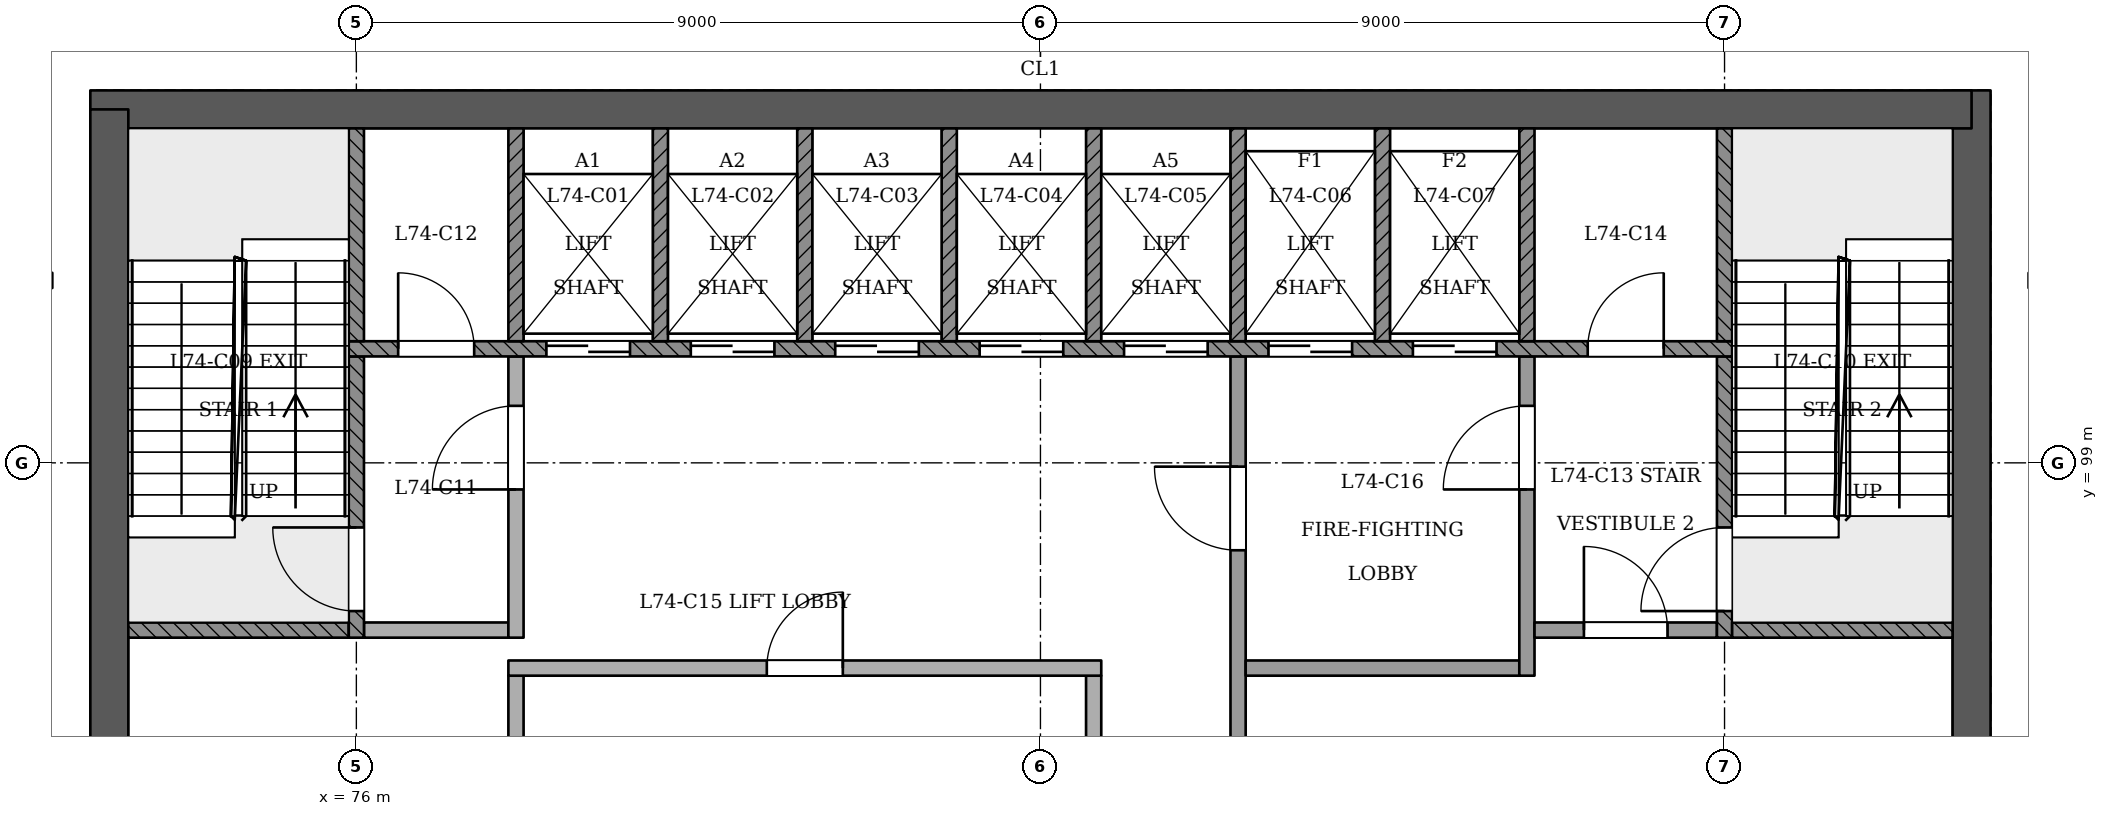
"""IFC4 building model, lengths in metres.
Left out: names, types, materials, properties, quantities, classifications, styles, units other than length and angle.
Written with IfcOpenShell. Run it as: python <this file> out.ifc"""

import sys

from ifc_helpers import new_model, si_unit, direction, frame, frame_2d, origin, place, context, subcontext, project, spatial, rectangle, extrude, element, fill, save


model = new_model("IFC4")
c1 = context("Model", 3, precision=1e-05, world=origin(), true_north=direction((0.0, 1.0)))
c2 = subcontext(c1, "Body", "Model", "MODEL_VIEW")
j1 = project(units=[si_unit("LENGTHUNIT", "METRE"), si_unit("PLANEANGLEUNIT", "RADIAN")], contexts=[c1])
p1 = place(None, origin())
s1 = spatial("IfcSite", under=j1, at=p1, CompositionType="ELEMENT")
p2 = place(p1, origin())
s2 = spatial("IfcBuilding", under=s1, at=p2, CompositionType="ELEMENT")
p3 = place(p2, frame((0.0, 0.0, 286.0)))
s3 = spatial("IfcBuildingStorey", under=s2, at=p3, CompositionType="ELEMENT", Elevation=286.0)
p4 = place(p3, frame((97.25, 93.15, 0.0), z_axis=(0.0, 0.0, 1.0), x_axis=(0.0, 1.0, 0.0)))
e1 = element("IfcWall", 1, at=p4, inside=s3, PredefinedType="SHEAR", context=c2, shape_type="SweptSolid", body=[
    extrude(rectangle(XDim=10.75, YDim=0.5, at=frame_2d((5.375, 0.0))), origin(), (0.0, 0.0, 1.0), 5.4),
])
p5 = place(p3, frame((97.25, 103.65, 0.0), z_axis=(0.0, 0.0, 1.0), x_axis=(-1.0, 0.0, 0.0)))
e2 = element("IfcWall", 2, at=p5, inside=s3, PredefinedType="SHEAR", context=c2, shape_type="SweptSolid", body=[
    extrude(rectangle(XDim=24.75, YDim=0.5, at=frame_2d((12.375, 0.0))), origin(), (0.0, 0.0, 1.0), 5.4),
])
p6 = place(p3, frame((72.75, 103.65, 0.0), z_axis=(0.0, 0.0, 1.0), x_axis=(0.0, -1.0, 0.0)))
e3 = element("IfcWall", 3, at=p6, inside=s3, PredefinedType="SHEAR", context=c2, shape_type="SweptSolid", body=[
    extrude(rectangle(XDim=10.75, YDim=0.5, at=frame_2d((5.375, 0.0))), origin(), (0.0, 0.0, 1.0), 5.4),
])
p7 = place(p3, frame((99.704, 101.4, 0.0), z_axis=(0.0, 0.0, 1.0), x_axis=(-1.0, 0.0, 0.0)))
e4 = element("IfcWall", 4, at=p7, inside=s3, PredefinedType="PARTITIONING", context=c2, shape_type="SweptSolid", body=[
    extrude(rectangle(XDim=1.704, YDim=0.2, at=frame_2d((0.852, 0.0))), origin(), (0.0, 0.0, 1.0), 5.0),
])
for number, where, z_axis, x_axis in (
    (5, (78.1, 93.4, 0.0), (0.0, 0.0, 1.0), (0.0, 1.0, 0.0)),
    (6, (85.7, 93.4, 0.0), (0.0, 0.0, 1.0), (0.0, 1.0, 0.0)),
):
    element("IfcWall", number, at=place(p3, frame(where, z_axis=z_axis, x_axis=x_axis)), inside=s3, PredefinedType="PARTITIONING", context=c2, shape_type="SweptSolid", body=[
        extrude(rectangle(XDim=2.8, YDim=0.2, at=frame_2d((1.4, 0.0))), origin(), (0.0, 0.0, 1.0), 5.0),
    ])
p8 = place(p3, frame((87.6, 93.4, 0.0), z_axis=(0.0, 0.0, 1.0), x_axis=(0.0, 1.0, 0.0)))
e7 = element("IfcWall", 7, at=p8, inside=s3, PredefinedType="PARTITIONING", context=c2, shape_type="SweptSolid", body=[
    extrude(rectangle(XDim=7.0, YDim=0.2, at=frame_2d((3.5, 0.0))), origin(), (0.0, 0.0, 1.0), 5.0),
])
p9 = place(p8, frame((4.45, 0.0, 0.0)))
e8 = element("IfcOpeningElement", 8, at=p9, cuts=e7, PredefinedType="OPENING", context=c2, shape_type="SweptSolid", body=[
    extrude(rectangle(XDim=1.1, YDim=2.1, at=frame_2d((0.55, 1.05))), frame((0.0, 0.11, 0.0), z_axis=(0.0, -1.0, 0.0), x_axis=(1.0, 0.0, 0.0)), (0.0, 0.0, 1.0), 0.221),
])
p10 = place(p3, frame((78.0, 96.3, 0.0), z_axis=(0.0, 0.0, 1.0), x_axis=(1.0, 0.0, 0.0)))
e9 = element("IfcWall", 9, at=p10, inside=s3, PredefinedType="PARTITIONING", context=c2, shape_type="SweptSolid", body=[
    extrude(rectangle(XDim=7.8, YDim=0.2, at=frame_2d((3.9, 0.0))), origin(), (0.0, 0.0, 1.0), 5.0),
])
p11 = place(p10, frame((3.4, 0.0, 0.0)))
e10 = element("IfcOpeningElement", 10, at=p11, cuts=e9, PredefinedType="OPENING", context=c2, shape_type="SweptSolid", body=[
    extrude(rectangle(XDim=1.0, YDim=2.1, at=frame_2d((0.5, 1.05))), frame((0.0, 0.11, 0.0), z_axis=(0.0, -1.0, 0.0), x_axis=(1.0, 0.0, 0.0)), (0.0, 0.0, 1.0), 0.221),
])
p12 = place(p3, frame((87.7, 96.3, 0.0), z_axis=(0.0, 0.0, 1.0), x_axis=(1.0, 0.0, 0.0)))
e11 = element("IfcWall", 11, at=p12, inside=s3, PredefinedType="PARTITIONING", context=c2, shape_type="SweptSolid", body=[
    extrude(rectangle(XDim=3.6, YDim=0.2, at=frame_2d((1.8, 0.0))), origin(), (0.0, 0.0, 1.0), 5.0),
])
p13 = place(p3, frame((91.4, 96.2, 0.0), z_axis=(0.0, 0.0, 1.0), x_axis=(0.0, 1.0, 0.0)))
e12 = element("IfcWall", 12, at=p13, inside=s3, PredefinedType="PARTITIONING", context=c2, shape_type="SweptSolid", body=[
    extrude(rectangle(XDim=4.2, YDim=0.2, at=frame_2d((2.1, 0.0))), origin(), (0.0, 0.0, 1.0), 5.0),
])
p14 = place(p13, frame((2.45, 0.0, 0.0)))
e13 = element("IfcOpeningElement", 13, at=p14, cuts=e12, PredefinedType="OPENING", context=c2, shape_type="SweptSolid", body=[
    extrude(rectangle(XDim=1.1, YDim=2.1, at=frame_2d((0.55, 1.05))), frame((0.0, 0.11, 0.0), z_axis=(0.0, -1.0, 0.0), x_axis=(1.0, 0.0, 0.0)), (0.0, 0.0, 1.0), 0.221),
])
p15 = place(p3, frame((73.0, 96.8, 0.0), z_axis=(0.0, 0.0, 1.0), x_axis=(1.0, 0.0, 0.0)))
e14 = element("IfcWall", 14, at=p15, inside=s3, PredefinedType="SOLIDWALL", context=c2, shape_type="SweptSolid", body=[
    extrude(rectangle(XDim=2.9, YDim=0.2, at=frame_2d((1.45, 0.0))), origin(), (0.0, 0.0, 1.0), 5.0),
])
p16 = place(p3, frame((76.0, 96.7, 0.0), z_axis=(0.0, 0.0, 1.0), x_axis=(0.0, 1.0, 0.0)))
e15 = element("IfcWall", 15, at=p16, inside=s3, PredefinedType="SOLIDWALL", context=c2, shape_type="SweptSolid", body=[
    extrude(rectangle(XDim=3.7, YDim=0.2, at=frame_2d((1.85, 0.0))), origin(), (0.0, 0.0, 1.0), 5.0),
])
p17 = place(p16, frame((0.35, 0.0, 0.0)))
e16 = element("IfcOpeningElement", 16, at=p17, cuts=e15, PredefinedType="OPENING", context=c2, shape_type="SweptSolid", body=[
    extrude(rectangle(XDim=1.1, YDim=2.1, at=frame_2d((0.55, 1.05))), frame((0.0, 0.11, 0.0), z_axis=(0.0, -1.0, 0.0), x_axis=(1.0, 0.0, 0.0)), (0.0, 0.0, 1.0), 0.221),
])
p18 = place(p3, frame((76.1, 96.8, 0.0), z_axis=(0.0, 0.0, 1.0), x_axis=(1.0, 0.0, 0.0)))
e17 = element("IfcWall", 17, at=p18, inside=s3, PredefinedType="PARTITIONING", context=c2, shape_type="SweptSolid", body=[
    extrude(rectangle(XDim=1.9, YDim=0.2, at=frame_2d((0.95, 0.0))), origin(), (0.0, 0.0, 1.0), 5.0),
])
p19 = place(p3, frame((78.1, 96.7, 0.0), z_axis=(0.0, 0.0, 1.0), x_axis=(0.0, 1.0, 0.0)))
e18 = element("IfcWall", 18, at=p19, inside=s3, PredefinedType="PARTITIONING", context=c2, shape_type="SweptSolid", body=[
    extrude(rectangle(XDim=3.7, YDim=0.2, at=frame_2d((1.85, 0.0))), origin(), (0.0, 0.0, 1.0), 5.0),
])
p20 = place(p19, frame((1.95, 0.0, 0.0)))
e19 = element("IfcOpeningElement", 19, at=p20, cuts=e18, PredefinedType="OPENING", context=c2, shape_type="SweptSolid", body=[
    extrude(rectangle(XDim=1.1, YDim=2.1, at=frame_2d((0.55, 1.05))), frame((0.0, 0.11, 0.0), z_axis=(0.0, -1.0, 0.0), x_axis=(1.0, 0.0, 0.0)), (0.0, 0.0, 1.0), 0.221),
])
p21 = place(p3, frame((91.5, 96.8, 0.0), z_axis=(0.0, 0.0, 1.0), x_axis=(1.0, 0.0, 0.0)))
e20 = element("IfcWall", 20, at=p21, inside=s3, PredefinedType="PARTITIONING", context=c2, shape_type="SweptSolid", body=[
    extrude(rectangle(XDim=2.4, YDim=0.2, at=frame_2d((1.2, 0.0))), origin(), (0.0, 0.0, 1.0), 5.0),
])
p22 = place(p21, frame((0.65, 0.0, 0.0)))
e21 = element("IfcOpeningElement", 21, at=p22, cuts=e20, PredefinedType="OPENING", context=c2, shape_type="SweptSolid", body=[
    extrude(rectangle(XDim=1.1, YDim=2.1, at=frame_2d((0.55, 1.05))), frame((0.0, 0.11, 0.0), z_axis=(0.0, -1.0, 0.0), x_axis=(1.0, 0.0, 0.0)), (0.0, 0.0, 1.0), 0.221),
])
p23 = place(p3, frame((94.0, 96.7, 0.0), z_axis=(0.0, 0.0, 1.0), x_axis=(0.0, 1.0, 0.0)))
e22 = element("IfcWall", 22, at=p23, inside=s3, PredefinedType="SOLIDWALL", context=c2, shape_type="SweptSolid", body=[
    extrude(rectangle(XDim=3.7, YDim=0.2, at=frame_2d((1.85, 0.0))), origin(), (0.0, 0.0, 1.0), 5.0),
])
p24 = place(p23, frame((0.35, 0.0, 0.0)))
e23 = element("IfcOpeningElement", 23, at=p24, cuts=e22, PredefinedType="OPENING", context=c2, shape_type="SweptSolid", body=[
    extrude(rectangle(XDim=1.1, YDim=2.1, at=frame_2d((0.55, 1.05))), frame((0.0, 0.11, 0.0), z_axis=(0.0, -1.0, 0.0), x_axis=(1.0, 0.0, 0.0)), (0.0, 0.0, 1.0), 0.221),
])
p25 = place(p3, frame((94.1, 96.8, 0.0), z_axis=(0.0, 0.0, 1.0), x_axis=(1.0, 0.0, 0.0)))
e24 = element("IfcWall", 24, at=p25, inside=s3, PredefinedType="SOLIDWALL", context=c2, shape_type="SweptSolid", body=[
    extrude(rectangle(XDim=2.9, YDim=0.2, at=frame_2d((1.45, 0.0))), origin(), (0.0, 0.0, 1.0), 5.0),
])
p26 = place(p3, frame((75.9, 100.5, 0.0), z_axis=(0.0, 0.0, 1.0), x_axis=(1.0, 0.0, 0.0)))
e25 = element("IfcWall", 25, at=p26, inside=s3, PredefinedType="SOLIDWALL", context=c2, shape_type="SweptSolid", body=[
    extrude(rectangle(XDim=18.2, YDim=0.2, at=frame_2d((9.1, 0.0))), origin(), (0.0, 0.0, 1.0), 5.0),
])
p27 = place(p26, frame((2.6, 0.0, 0.0)))
e26 = element("IfcOpeningElement", 26, at=p27, cuts=e25, PredefinedType="OPENING", context=c2, shape_type="SweptSolid", body=[
    extrude(rectangle(XDim=1.1, YDim=2.1, at=frame_2d((0.55, 1.05))), frame((0.0, 0.11, 0.0), z_axis=(0.0, -1.0, 0.0), x_axis=(1.0, 0.0, 0.0)), (0.0, 0.0, 1.0), 0.221),
])
p28 = place(p26, frame((4.5, 0.0, 0.0)))
e27 = element("IfcOpeningElement", 27, at=p28, cuts=e25, PredefinedType="OPENING", context=c2, shape_type="SweptSolid", body=[
    extrude(rectangle(XDim=1.1, YDim=2.1, at=frame_2d((0.55, 1.05))), frame((0.0, 0.11, 0.0), z_axis=(0.0, -1.0, 0.0), x_axis=(1.0, 0.0, 0.0)), (0.0, 0.0, 1.0), 0.221),
])
p29 = place(p26, frame((6.4, 0.0, 0.0)))
e28 = element("IfcOpeningElement", 28, at=p29, cuts=e25, PredefinedType="OPENING", context=c2, shape_type="SweptSolid", body=[
    extrude(rectangle(XDim=1.1, YDim=2.1, at=frame_2d((0.55, 1.05))), frame((0.0, 0.11, 0.0), z_axis=(0.0, -1.0, 0.0), x_axis=(1.0, 0.0, 0.0)), (0.0, 0.0, 1.0), 0.221),
])
p30 = place(p26, frame((8.3, 0.0, 0.0)))
e29 = element("IfcOpeningElement", 29, at=p30, cuts=e25, PredefinedType="OPENING", context=c2, shape_type="SweptSolid", body=[
    extrude(rectangle(XDim=1.1, YDim=2.1, at=frame_2d((0.55, 1.05))), frame((0.0, 0.11, 0.0), z_axis=(0.0, -1.0, 0.0), x_axis=(1.0, 0.0, 0.0)), (0.0, 0.0, 1.0), 0.221),
])
p31 = place(p26, frame((10.2, 0.0, 0.0)))
e30 = element("IfcOpeningElement", 30, at=p31, cuts=e25, PredefinedType="OPENING", context=c2, shape_type="SweptSolid", body=[
    extrude(rectangle(XDim=1.1, YDim=2.1, at=frame_2d((0.55, 1.05))), frame((0.0, 0.11, 0.0), z_axis=(0.0, -1.0, 0.0), x_axis=(1.0, 0.0, 0.0)), (0.0, 0.0, 1.0), 0.221),
])
p32 = place(p26, frame((12.1, 0.0, 0.0)))
e31 = element("IfcOpeningElement", 31, at=p32, cuts=e25, PredefinedType="OPENING", context=c2, shape_type="SweptSolid", body=[
    extrude(rectangle(XDim=1.1, YDim=2.1, at=frame_2d((0.55, 1.05))), frame((0.0, 0.11, 0.0), z_axis=(0.0, -1.0, 0.0), x_axis=(1.0, 0.0, 0.0)), (0.0, 0.0, 1.0), 0.221),
])
p33 = place(p26, frame((14.0, 0.0, 0.0)))
e32 = element("IfcOpeningElement", 32, at=p33, cuts=e25, PredefinedType="OPENING", context=c2, shape_type="SweptSolid", body=[
    extrude(rectangle(XDim=1.1, YDim=2.1, at=frame_2d((0.55, 1.05))), frame((0.0, 0.11, 0.0), z_axis=(0.0, -1.0, 0.0), x_axis=(1.0, 0.0, 0.0)), (0.0, 0.0, 1.0), 0.221),
])
p34 = place(p26, frame((0.65, 0.0, 0.0)))
e33 = element("IfcOpeningElement", 33, at=p34, cuts=e25, PredefinedType="OPENING", context=c2, shape_type="SweptSolid", body=[
    extrude(rectangle(XDim=1.0, YDim=2.1, at=frame_2d((0.5, 1.05))), frame((0.0, 0.11, 0.0), z_axis=(0.0, -1.0, 0.0), x_axis=(1.0, 0.0, 0.0)), (0.0, 0.0, 1.0), 0.221),
])
p35 = place(p26, frame((16.3, 0.0, 0.0)))
e34 = element("IfcOpeningElement", 34, at=p35, cuts=e25, PredefinedType="OPENING", context=c2, shape_type="SweptSolid", body=[
    extrude(rectangle(XDim=1.0, YDim=2.1, at=frame_2d((0.5, 1.05))), frame((0.0, 0.11, 0.0), z_axis=(0.0, -1.0, 0.0), x_axis=(1.0, 0.0, 0.0)), (0.0, 0.0, 1.0), 0.221),
])
for number, where, z_axis, x_axis in (
    (35, (76.0, 100.6, 0.0), (0.0, 0.0, 1.0), (0.0, 1.0, 0.0)),
    (36, (78.1, 100.6, 0.0), (0.0, 0.0, 1.0), (0.0, 1.0, 0.0)),
    (37, (80.0, 100.6, 0.0), (0.0, 0.0, 1.0), (0.0, 1.0, 0.0)),
    (38, (81.9, 100.6, 0.0), (0.0, 0.0, 1.0), (0.0, 1.0, 0.0)),
    (39, (83.8, 100.6, 0.0), (0.0, 0.0, 1.0), (0.0, 1.0, 0.0)),
    (40, (85.7, 100.6, 0.0), (0.0, 0.0, 1.0), (0.0, 1.0, 0.0)),
    (41, (87.6, 100.6, 0.0), (0.0, 0.0, 1.0), (0.0, 1.0, 0.0)),
    (42, (89.5, 100.6, 0.0), (0.0, 0.0, 1.0), (0.0, 1.0, 0.0)),
    (43, (91.4, 100.6, 0.0), (0.0, 0.0, 1.0), (0.0, 1.0, 0.0)),
    (44, (94.0, 100.6, 0.0), (0.0, 0.0, 1.0), (0.0, 1.0, 0.0)),
):
    element("IfcWall", number, at=place(p3, frame(where, z_axis=z_axis, x_axis=x_axis)), inside=s3, PredefinedType="SOLIDWALL", context=c2, shape_type="SweptSolid", body=[
        extrude(rectangle(XDim=2.8, YDim=0.2, at=frame_2d((1.4, 0.0))), origin(), (0.0, 0.0, 1.0), 5.0),
    ])
p36 = place(p27, origin())
e45 = element("IfcDoor", 45, at=p36, inside=s3, OperationType="SLIDING_TO_RIGHT", PredefinedType="NOTDEFINED", context=c2, shape_type="SweptSolid", body=[
    extrude(rectangle(XDim=1.1, YDim=2.1, at=frame_2d((0.55, 1.05))), frame((0.0, 0.025, 0.0), z_axis=(0.0, -1.0, 0.0), x_axis=(1.0, 0.0, 0.0)), (0.0, 0.0, 1.0), 0.05),
])
fill(e26, e45)
p37 = place(p28, origin())
e46 = element("IfcDoor", 46, at=p37, inside=s3, OperationType="SLIDING_TO_LEFT", PredefinedType="NOTDEFINED", context=c2, shape_type="SweptSolid", body=[
    extrude(rectangle(XDim=1.1, YDim=2.1, at=frame_2d((0.55, 1.05))), frame((0.0, 0.025, 0.0), z_axis=(0.0, -1.0, 0.0), x_axis=(1.0, 0.0, 0.0)), (0.0, 0.0, 1.0), 0.05),
])
fill(e27, e46)
p38 = place(p29, origin())
e47 = element("IfcDoor", 47, at=p38, inside=s3, OperationType="SLIDING_TO_RIGHT", PredefinedType="NOTDEFINED", context=c2, shape_type="SweptSolid", body=[
    extrude(rectangle(XDim=1.1, YDim=2.1, at=frame_2d((0.55, 1.05))), frame((0.0, 0.025, 0.0), z_axis=(0.0, -1.0, 0.0), x_axis=(1.0, 0.0, 0.0)), (0.0, 0.0, 1.0), 0.05),
])
fill(e28, e47)
p39 = place(p30, origin())
e48 = element("IfcDoor", 48, at=p39, inside=s3, OperationType="SLIDING_TO_LEFT", PredefinedType="NOTDEFINED", context=c2, shape_type="SweptSolid", body=[
    extrude(rectangle(XDim=1.1, YDim=2.1, at=frame_2d((0.55, 1.05))), frame((0.0, 0.025, 0.0), z_axis=(0.0, -1.0, 0.0), x_axis=(1.0, 0.0, 0.0)), (0.0, 0.0, 1.0), 0.05),
])
fill(e29, e48)
p40 = place(p31, origin())
e49 = element("IfcDoor", 49, at=p40, inside=s3, OperationType="SLIDING_TO_RIGHT", PredefinedType="NOTDEFINED", context=c2, shape_type="SweptSolid", body=[
    extrude(rectangle(XDim=1.1, YDim=2.1, at=frame_2d((0.55, 1.05))), frame((0.0, 0.025, 0.0), z_axis=(0.0, -1.0, 0.0), x_axis=(1.0, 0.0, 0.0)), (0.0, 0.0, 1.0), 0.05),
])
fill(e30, e49)
p41 = place(p32, origin())
e50 = element("IfcDoor", 50, at=p41, inside=s3, OperationType="SLIDING_TO_RIGHT", PredefinedType="NOTDEFINED", context=c2, shape_type="SweptSolid", body=[
    extrude(rectangle(XDim=1.1, YDim=2.1, at=frame_2d((0.55, 1.05))), frame((0.0, 0.025, 0.0), z_axis=(0.0, -1.0, 0.0), x_axis=(1.0, 0.0, 0.0)), (0.0, 0.0, 1.0), 0.05),
])
fill(e31, e50)
p42 = place(p33, origin())
e51 = element("IfcDoor", 51, at=p42, inside=s3, OperationType="SLIDING_TO_LEFT", PredefinedType="NOTDEFINED", context=c2, shape_type="SweptSolid", body=[
    extrude(rectangle(XDim=1.1, YDim=2.1, at=frame_2d((0.55, 1.05))), frame((0.0, 0.025, 0.0), z_axis=(0.0, -1.0, 0.0), x_axis=(1.0, 0.0, 0.0)), (0.0, 0.0, 1.0), 0.05),
])
fill(e32, e51)
p43 = place(p17, origin())
e52 = element("IfcDoor", 52, at=p43, inside=s3, OperationType="SINGLE_SWING_RIGHT", PredefinedType="NOTDEFINED", context=c2, shape_type="SweptSolid", body=[
    extrude(rectangle(XDim=1.1, YDim=2.1, at=frame_2d((0.55, 1.05))), frame((0.0, 0.025, 0.0), z_axis=(0.0, -1.0, 0.0), x_axis=(1.0, 0.0, 0.0)), (0.0, 0.0, 1.0), 0.05),
])
fill(e16, e52)
p44 = place(p24, origin())
e53 = element("IfcDoor", 53, at=p44, inside=s3, OperationType="SINGLE_SWING_LEFT", PredefinedType="NOTDEFINED", context=c2, shape_type="SweptSolid", body=[
    extrude(rectangle(XDim=1.1, YDim=2.1, at=frame_2d((0.55, 1.05))), frame((0.0, 0.025, 0.0), z_axis=(0.0, -1.0, 0.0), x_axis=(1.0, 0.0, 0.0)), (0.0, 0.0, 1.0), 0.05),
])
fill(e23, e53)
p45 = place(p20, origin())
e54 = element("IfcDoor", 54, at=p45, inside=s3, OperationType="SINGLE_SWING_LEFT", PredefinedType="NOTDEFINED", context=c2, shape_type="SweptSolid", body=[
    extrude(rectangle(XDim=1.1, YDim=2.1, at=frame_2d((0.55, 1.05))), frame((0.0, 0.025, 0.0), z_axis=(0.0, -1.0, 0.0), x_axis=(1.0, 0.0, 0.0)), (0.0, 0.0, 1.0), 0.05),
])
fill(e19, e54)
p46 = place(p9, origin())
e55 = element("IfcDoor", 55, at=p46, inside=s3, OperationType="SINGLE_SWING_RIGHT", PredefinedType="NOTDEFINED", context=c2, shape_type="SweptSolid", body=[
    extrude(rectangle(XDim=1.1, YDim=2.1, at=frame_2d((0.55, 1.05))), frame((0.0, 0.025, 0.0), z_axis=(0.0, -1.0, 0.0), x_axis=(1.0, 0.0, 0.0)), (0.0, 0.0, 1.0), 0.05),
])
fill(e8, e55)
p47 = place(p14, origin())
e56 = element("IfcDoor", 56, at=p47, inside=s3, OperationType="SINGLE_SWING_LEFT", PredefinedType="NOTDEFINED", context=c2, shape_type="SweptSolid", body=[
    extrude(rectangle(XDim=1.1, YDim=2.1, at=frame_2d((0.55, 1.05))), frame((0.0, 0.025, 0.0), z_axis=(0.0, -1.0, 0.0), x_axis=(1.0, 0.0, 0.0)), (0.0, 0.0, 1.0), 0.05),
])
fill(e13, e56)
p48 = place(p34, origin())
e57 = element("IfcDoor", 57, at=p48, inside=s3, OperationType="SINGLE_SWING_LEFT", PredefinedType="NOTDEFINED", context=c2, shape_type="SweptSolid", body=[
    extrude(rectangle(XDim=1.0, YDim=2.1, at=frame_2d((0.5, 1.05))), frame((0.0, 0.025, 0.0), z_axis=(0.0, -1.0, 0.0), x_axis=(1.0, 0.0, 0.0)), (0.0, 0.0, 1.0), 0.05),
])
fill(e33, e57)
p49 = place(p35, origin())
e58 = element("IfcDoor", 58, at=p49, inside=s3, OperationType="SINGLE_SWING_RIGHT", PredefinedType="NOTDEFINED", context=c2, shape_type="SweptSolid", body=[
    extrude(rectangle(XDim=1.0, YDim=2.1, at=frame_2d((0.5, 1.05))), frame((0.0, 0.025, 0.0), z_axis=(0.0, -1.0, 0.0), x_axis=(1.0, 0.0, 0.0)), (0.0, 0.0, 1.0), 0.05),
])
fill(e34, e58)
p50 = place(p22, origin())
e59 = element("IfcDoor", 59, at=p50, inside=s3, OperationType="SINGLE_SWING_LEFT", PredefinedType="NOTDEFINED", context=c2, shape_type="SweptSolid", body=[
    extrude(rectangle(XDim=1.1, YDim=2.1, at=frame_2d((0.55, 1.05))), frame((0.0, 0.025, 0.0), z_axis=(0.0, -1.0, 0.0), x_axis=(1.0, 0.0, 0.0)), (0.0, 0.0, 1.0), 0.05),
])
fill(e21, e59)
p51 = place(p11, origin())
e60 = element("IfcDoor", 60, at=p51, inside=s3, OperationType="SINGLE_SWING_RIGHT", PredefinedType="NOTDEFINED", context=c2, shape_type="SweptSolid", body=[
    extrude(rectangle(XDim=1.0, YDim=2.1, at=frame_2d((0.5, 1.05))), frame((0.0, 0.025, 0.0), z_axis=(0.0, -1.0, 0.0), x_axis=(1.0, 0.0, 0.0)), (0.0, 0.0, 1.0), 0.05),
])
fill(e10, e60)
save(model, sys.argv[1])
